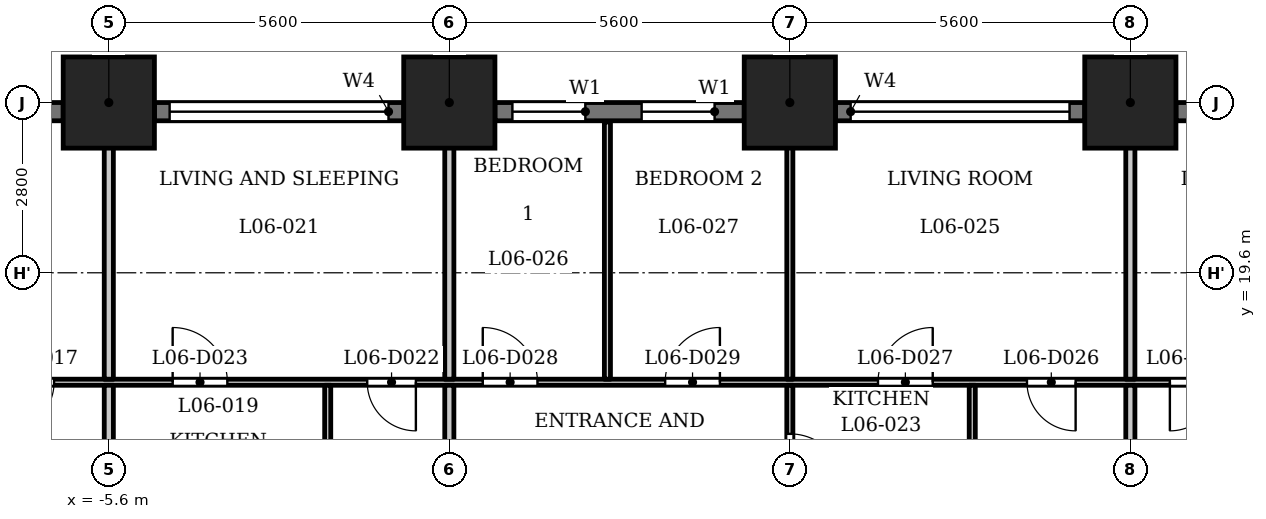
"""IFC4 building model, lengths in metres.
Left out: names, types, materials, properties, quantities, classifications, styles, units other than length and angle.
Written with IfcOpenShell. Run it as: python <this file> out.ifc"""

import sys

from ifc_helpers import new_model, si_unit, direction, frame, frame_2d, origin, origin_2d, place, context, subcontext, project, spatial, rectangle, extrude, element, fill, save


model = new_model("IFC4")
c1 = context("Model", 3, precision=1e-05, world=origin(), true_north=direction((0.0, 1.0)))
c2 = subcontext(c1, "Body", "Model", "MODEL_VIEW")
j1 = project(units=[si_unit("LENGTHUNIT", "METRE"), si_unit("PLANEANGLEUNIT", "RADIAN")], contexts=[c1])
p1 = place(None, origin())
s1 = spatial("IfcSite", under=j1, at=p1, CompositionType="ELEMENT")
p2 = place(p1, origin())
s2 = spatial("IfcBuilding", under=s1, at=p2, CompositionType="ELEMENT")
p3 = place(p2, frame((0.0, 0.0, 30.5)))
s3 = spatial("IfcBuildingStorey", under=s2, at=p3, CompositionType="ELEMENT", Elevation=30.5)
for number, where, z_axis, x_axis in (
    (1, (11.2, 22.4, 0.0), (0.0, 0.0, 1.0), (1.0, 0.0, 0.0)),
    (2, (5.6, 22.4, 0.0), (0.0, 0.0, 1.0), (1.0, 0.0, 0.0)),
    (3, (0.0, 22.4, 0.0), (0.0, 0.0, 1.0), (1.0, 0.0, 0.0)),
    (4, (-5.6, 22.4, 0.0), (0.0, 0.0, 1.0), (1.0, 0.0, 0.0)),
):
    element("IfcColumn", number, at=place(p3, frame(where, z_axis=z_axis, x_axis=x_axis)), inside=s3, PredefinedType="COLUMN", context=c2, shape_type="SweptSolid", body=[
        extrude(rectangle(XDim=1.5, YDim=1.5, at=origin_2d()), origin(), (0.0, 0.0, 1.0), 3.5),
    ])
p4 = place(p3, frame((16.05, 22.25, 0.0), z_axis=(0.0, 0.0, 1.0), x_axis=(-1.0, 0.0, 0.0)))
e5 = element("IfcWall", 5, at=p4, inside=s3, PredefinedType="SOLIDWALL", context=c2, shape_type="SweptSolid", body=[
    extrude(rectangle(XDim=4.1, YDim=0.3, at=frame_2d((2.05, 0.0))), origin(), (0.0, 0.0, 1.0), 2.35),
])
p5 = place(p4, frame((0.25, 0.0, 1.2)))
e6 = element("IfcOpeningElement", 6, at=p5, cuts=e5, PredefinedType="OPENING", context=c2, shape_type="SweptSolid", body=[
    extrude(rectangle(XDim=3.6, YDim=0.95, at=frame_2d((1.8, 0.475))), frame((0.0, 0.16, 0.0), z_axis=(0.0, -1.0, 0.0), x_axis=(1.0, 0.0, 0.0)), (0.0, 0.0, 1.0), 0.32),
])
p6 = place(p3, frame((10.45, 22.25, 0.0), z_axis=(0.0, 0.0, 1.0), x_axis=(-1.0, 0.0, 0.0)))
e7 = element("IfcWall", 7, at=p6, inside=s3, PredefinedType="SOLIDWALL", context=c2, shape_type="SweptSolid", body=[
    extrude(rectangle(XDim=4.1, YDim=0.3, at=frame_2d((2.05, 0.0))), origin(), (0.0, 0.0, 1.0), 2.35),
])
p7 = place(p6, frame((0.25, 0.0, 1.2)))
e8 = element("IfcOpeningElement", 8, at=p7, cuts=e7, PredefinedType="OPENING", context=c2, shape_type="SweptSolid", body=[
    extrude(rectangle(XDim=3.6, YDim=0.95, at=frame_2d((1.8, 0.475))), frame((0.0, 0.16, 0.0), z_axis=(0.0, -1.0, 0.0), x_axis=(1.0, 0.0, 0.0)), (0.0, 0.0, 1.0), 0.32),
])
p8 = place(p3, frame((4.85, 22.25, 0.0), z_axis=(0.0, 0.0, 1.0), x_axis=(-1.0, 0.0, 0.0)))
e9 = element("IfcWall", 9, at=p8, inside=s3, PredefinedType="SOLIDWALL", context=c2, shape_type="SweptSolid", body=[
    extrude(rectangle(XDim=4.1, YDim=0.3, at=frame_2d((2.05, 0.0))), origin(), (0.0, 0.0, 1.0), 2.35),
])
p9 = place(p8, frame((0.488, 0.0, 0.6)))
e10 = element("IfcOpeningElement", 10, at=p9, cuts=e9, PredefinedType="OPENING", context=c2, shape_type="SweptSolid", body=[
    extrude(rectangle(XDim=1.2, YDim=1.55, at=frame_2d((0.6, 0.775))), frame((0.0, 0.16, 0.0), z_axis=(0.0, -1.0, 0.0), x_axis=(1.0, 0.0, 0.0)), (0.0, 0.0, 1.0), 0.32),
])
p10 = place(p8, frame((2.613, 0.0, 0.6)))
e11 = element("IfcOpeningElement", 11, at=p10, cuts=e9, PredefinedType="OPENING", context=c2, shape_type="SweptSolid", body=[
    extrude(rectangle(XDim=1.2, YDim=1.55, at=frame_2d((0.6, 0.775))), frame((0.0, 0.16, 0.0), z_axis=(0.0, -1.0, 0.0), x_axis=(1.0, 0.0, 0.0)), (0.0, 0.0, 1.0), 0.32),
])
p11 = place(p3, frame((-0.75, 22.25, 0.0), z_axis=(0.0, 0.0, 1.0), x_axis=(-1.0, 0.0, 0.0)))
e12 = element("IfcWall", 12, at=p11, inside=s3, PredefinedType="SOLIDWALL", context=c2, shape_type="SweptSolid", body=[
    extrude(rectangle(XDim=4.1, YDim=0.3, at=frame_2d((2.05, 0.0))), origin(), (0.0, 0.0, 1.0), 2.35),
])
p12 = place(p11, frame((0.25, 0.0, 1.2)))
e13 = element("IfcOpeningElement", 13, at=p12, cuts=e12, PredefinedType="OPENING", context=c2, shape_type="SweptSolid", body=[
    extrude(rectangle(XDim=3.6, YDim=0.95, at=frame_2d((1.8, 0.475))), frame((0.0, 0.16, 0.0), z_axis=(0.0, -1.0, 0.0), x_axis=(1.0, 0.0, 0.0)), (0.0, 0.0, 1.0), 0.32),
])
p13 = place(p3, frame((-6.35, 22.25, 0.0), z_axis=(0.0, 0.0, 1.0), x_axis=(-1.0, 0.0, 0.0)))
e14 = element("IfcWall", 14, at=p13, inside=s3, PredefinedType="SOLIDWALL", context=c2, shape_type="SweptSolid", body=[
    extrude(rectangle(XDim=4.1, YDim=0.3, at=frame_2d((2.05, 0.0))), origin(), (0.0, 0.0, 1.0), 2.35),
])
p14 = place(p13, frame((0.75, 0.0, 0.9)))
e15 = element("IfcOpeningElement", 15, at=p14, cuts=e14, PredefinedType="OPENING", context=c2, shape_type="SweptSolid", body=[
    extrude(rectangle(XDim=2.6, YDim=1.25, at=frame_2d((1.3, 0.625))), frame((0.0, 0.16, 0.0), z_axis=(0.0, -1.0, 0.0), x_axis=(1.0, 0.0, 0.0)), (0.0, 0.0, 1.0), 0.32),
])
p15 = place(p3, frame((-26.732, 17.8, 0.0), z_axis=(0.0, 0.0, 1.0), x_axis=(1.0, 0.0, 0.0)))
e16 = element("IfcWall", 16, at=p15, inside=s3, PredefinedType="PARTITIONING", context=c2, shape_type="SweptSolid", body=[
    extrude(rectangle(XDim=53.126, YDim=0.1, at=frame_2d((26.563, 0.0))), origin(), (0.0, 0.0, 1.0), 3.2),
])
p16 = place(p15, frame((2.964, 0.0, 0.0)))
e17 = element("IfcOpeningElement", 17, at=p16, cuts=e16, PredefinedType="OPENING", context=c2, shape_type="SweptSolid", body=[
    extrude(rectangle(XDim=0.8, YDim=2.1, at=frame_2d((0.4, 1.05))), frame((0.0, 0.06, 0.0), z_axis=(0.0, -1.0, 0.0), x_axis=(1.0, 0.0, 0.0)), (0.0, 0.0, 1.0), 0.12),
])
p17 = place(p15, frame((7.132, 0.0, 0.0)))
e18 = element("IfcOpeningElement", 18, at=p17, cuts=e16, PredefinedType="OPENING", context=c2, shape_type="SweptSolid", body=[
    extrude(rectangle(XDim=0.9, YDim=2.1, at=frame_2d((0.45, 1.05))), frame((0.0, 0.06, 0.0), z_axis=(0.0, -1.0, 0.0), x_axis=(1.0, 0.0, 0.0)), (0.0, 0.0, 1.0), 0.12),
])
p18 = place(p15, frame((19.432, 0.0, 0.0)))
e19 = element("IfcOpeningElement", 19, at=p18, cuts=e16, PredefinedType="OPENING", context=c2, shape_type="SweptSolid", body=[
    extrude(rectangle(XDim=0.8, YDim=2.1, at=frame_2d((0.4, 1.05))), frame((0.0, 0.06, 0.0), z_axis=(0.0, -1.0, 0.0), x_axis=(1.0, 0.0, 0.0)), (0.0, 0.0, 1.0), 0.12),
])
p19 = place(p15, frame((16.732, 0.0, 0.0)))
e20 = element("IfcOpeningElement", 20, at=p19, cuts=e16, PredefinedType="OPENING", context=c2, shape_type="SweptSolid", body=[
    extrude(rectangle(XDim=0.9, YDim=2.1, at=frame_2d((0.45, 1.05))), frame((0.0, 0.06, 0.0), z_axis=(0.0, -1.0, 0.0), x_axis=(1.0, 0.0, 0.0)), (0.0, 0.0, 1.0), 0.12),
])
p20 = place(p15, frame((10.982, 0.0, 0.0)))
e21 = element("IfcOpeningElement", 21, at=p20, cuts=e16, PredefinedType="OPENING", context=c2, shape_type="SweptSolid", body=[
    extrude(rectangle(XDim=0.9, YDim=2.1, at=frame_2d((0.45, 1.05))), frame((0.0, 0.06, 0.0), z_axis=(0.0, -1.0, 0.0), x_axis=(1.0, 0.0, 0.0)), (0.0, 0.0, 1.0), 0.12),
])
p21 = place(p15, frame((12.982, 0.0, 0.0)))
e22 = element("IfcOpeningElement", 22, at=p21, cuts=e16, PredefinedType="OPENING", context=c2, shape_type="SweptSolid", body=[
    extrude(rectangle(XDim=0.9, YDim=2.1, at=frame_2d((0.45, 1.05))), frame((0.0, 0.06, 0.0), z_axis=(0.0, -1.0, 0.0), x_axis=(1.0, 0.0, 0.0)), (0.0, 0.0, 1.0), 0.12),
])
p22 = place(p15, frame((25.382, 0.0, 0.0)))
e23 = element("IfcOpeningElement", 23, at=p22, cuts=e16, PredefinedType="OPENING", context=c2, shape_type="SweptSolid", body=[
    extrude(rectangle(XDim=0.8, YDim=2.1, at=frame_2d((0.4, 1.05))), frame((0.0, 0.06, 0.0), z_axis=(0.0, -1.0, 0.0), x_axis=(1.0, 0.0, 0.0)), (0.0, 0.0, 1.0), 0.12),
])
p23 = place(p15, frame((22.182, 0.0, 0.0)))
e24 = element("IfcOpeningElement", 24, at=p23, cuts=e16, PredefinedType="OPENING", context=c2, shape_type="SweptSolid", body=[
    extrude(rectangle(XDim=0.9, YDim=2.1, at=frame_2d((0.45, 1.05))), frame((0.0, 0.06, 0.0), z_axis=(0.0, -1.0, 0.0), x_axis=(1.0, 0.0, 0.0)), (0.0, 0.0, 1.0), 0.12),
])
p24 = place(p15, frame((36.232, 0.0, 0.0)))
e25 = element("IfcOpeningElement", 25, at=p24, cuts=e16, PredefinedType="OPENING", context=c2, shape_type="SweptSolid", body=[
    extrude(rectangle(XDim=0.8, YDim=2.1, at=frame_2d((0.4, 1.05))), frame((0.0, 0.06, 0.0), z_axis=(0.0, -1.0, 0.0), x_axis=(1.0, 0.0, 0.0)), (0.0, 0.0, 1.0), 0.12),
])
p25 = place(p15, frame((33.782, 0.0, 0.0)))
e26 = element("IfcOpeningElement", 26, at=p25, cuts=e16, PredefinedType="OPENING", context=c2, shape_type="SweptSolid", body=[
    extrude(rectangle(XDim=0.9, YDim=2.1, at=frame_2d((0.45, 1.05))), frame((0.0, 0.06, 0.0), z_axis=(0.0, -1.0, 0.0), x_axis=(1.0, 0.0, 0.0)), (0.0, 0.0, 1.0), 0.12),
])
p26 = place(p15, frame((27.282, 0.0, 0.0)))
e27 = element("IfcOpeningElement", 27, at=p26, cuts=e16, PredefinedType="OPENING", context=c2, shape_type="SweptSolid", body=[
    extrude(rectangle(XDim=0.9, YDim=2.1, at=frame_2d((0.45, 1.05))), frame((0.0, 0.06, 0.0), z_axis=(0.0, -1.0, 0.0), x_axis=(1.0, 0.0, 0.0)), (0.0, 0.0, 1.0), 0.12),
])
p27 = place(p15, frame((30.282, 0.0, 0.0)))
e28 = element("IfcOpeningElement", 28, at=p27, cuts=e16, PredefinedType="OPENING", context=c2, shape_type="SweptSolid", body=[
    extrude(rectangle(XDim=0.9, YDim=2.1, at=frame_2d((0.45, 1.05))), frame((0.0, 0.06, 0.0), z_axis=(0.0, -1.0, 0.0), x_axis=(1.0, 0.0, 0.0)), (0.0, 0.0, 1.0), 0.12),
])
p28 = place(p15, frame((38.582, 0.0, 0.0)))
e29 = element("IfcOpeningElement", 29, at=p28, cuts=e16, PredefinedType="OPENING", context=c2, shape_type="SweptSolid", body=[
    extrude(rectangle(XDim=0.8, YDim=2.1, at=frame_2d((0.4, 1.05))), frame((0.0, 0.06, 0.0), z_axis=(0.0, -1.0, 0.0), x_axis=(1.0, 0.0, 0.0)), (0.0, 0.0, 1.0), 0.12),
])
p29 = place(p15, frame((41.232, 0.0, 0.0)))
e30 = element("IfcOpeningElement", 30, at=p29, cuts=e16, PredefinedType="OPENING", context=c2, shape_type="SweptSolid", body=[
    extrude(rectangle(XDim=0.9, YDim=2.1, at=frame_2d((0.45, 1.05))), frame((0.0, 0.06, 0.0), z_axis=(0.0, -1.0, 0.0), x_axis=(1.0, 0.0, 0.0)), (0.0, 0.0, 1.0), 0.12),
])
p30 = place(p15, frame((51.532, 0.0, 0.0)))
e31 = element("IfcOpeningElement", 31, at=p30, cuts=e16, PredefinedType="OPENING", context=c2, shape_type="SweptSolid", body=[
    extrude(rectangle(XDim=0.8, YDim=2.1, at=frame_2d((0.4, 1.05))), frame((0.0, 0.06, 0.0), z_axis=(0.0, -1.0, 0.0), x_axis=(1.0, 0.0, 0.0)), (0.0, 0.0, 1.0), 0.12),
])
p31 = place(p15, frame((46.582, 0.0, 0.0)))
e32 = element("IfcOpeningElement", 32, at=p31, cuts=e16, PredefinedType="OPENING", context=c2, shape_type="SweptSolid", body=[
    extrude(rectangle(XDim=0.9, YDim=2.1, at=frame_2d((0.45, 1.05))), frame((0.0, 0.06, 0.0), z_axis=(0.0, -1.0, 0.0), x_axis=(1.0, 0.0, 0.0)), (0.0, 0.0, 1.0), 0.12),
])
p32 = place(p3, frame((-5.6, 15.475, 0.0), z_axis=(0.0, 0.0, 1.0), x_axis=(0.0, 1.0, 0.0)))
e33 = element("IfcWall", 33, at=p32, inside=s3, PredefinedType="PARTITIONING", context=c2, shape_type="SweptSolid", body=[
    extrude(rectangle(XDim=2.275, YDim=0.15, at=frame_2d((1.137, 0.0))), origin(), (0.0, 0.0, 1.0), 3.2),
])
p33 = place(p3, frame((-5.6, 17.85, 0.0), z_axis=(0.0, 0.0, 1.0), x_axis=(0.0, 1.0, 0.0)))
e34 = element("IfcWall", 34, at=p33, inside=s3, PredefinedType="PARTITIONING", context=c2, shape_type="SweptSolid", body=[
    extrude(rectangle(XDim=5.28, YDim=0.15, at=frame_2d((2.64, 0.0))), origin(), (0.0, 0.0, 1.0), 3.2),
])
p34 = place(p3, frame((-2.0, 15.475, 0.0), z_axis=(0.0, 0.0, 1.0), x_axis=(0.0, 1.0, 0.0)))
e35 = element("IfcWall", 35, at=p34, inside=s3, PredefinedType="PARTITIONING", context=c2, shape_type="SweptSolid", body=[
    extrude(rectangle(XDim=2.275, YDim=0.1, at=frame_2d((1.137, 0.0))), origin(), (0.0, 0.0, 1.0), 3.2),
])
p35 = place(p3, frame((0.0, 15.475, 0.0), z_axis=(0.0, 0.0, 1.0), x_axis=(0.0, 1.0, 0.0)))
e36 = element("IfcWall", 36, at=p35, inside=s3, PredefinedType="PARTITIONING", context=c2, shape_type="SweptSolid", body=[
    extrude(rectangle(XDim=2.275, YDim=0.15, at=frame_2d((1.137, 0.0))), origin(), (0.0, 0.0, 1.0), 3.2),
])
p36 = place(p3, frame((0.0, 17.85, 0.0), z_axis=(0.0, 0.0, 1.0), x_axis=(0.0, 1.0, 0.0)))
e37 = element("IfcWall", 37, at=p36, inside=s3, PredefinedType="PARTITIONING", context=c2, shape_type="SweptSolid", body=[
    extrude(rectangle(XDim=5.28, YDim=0.15, at=frame_2d((2.64, 0.0))), origin(), (0.0, 0.0, 1.0), 3.2),
])
p37 = place(p3, frame((2.6, 17.85, 0.0), z_axis=(0.0, 0.0, 1.0), x_axis=(0.0, 1.0, 0.0)))
e38 = element("IfcWall", 38, at=p37, inside=s3, PredefinedType="PARTITIONING", context=c2, shape_type="SweptSolid", body=[
    extrude(rectangle(XDim=4.23, YDim=0.1, at=frame_2d((2.115, 0.0))), origin(), (0.0, 0.0, 1.0), 3.2),
])
p38 = place(p3, frame((5.6, 15.475, 0.0), z_axis=(0.0, 0.0, 1.0), x_axis=(0.0, 1.0, 0.0)))
e39 = element("IfcWall", 39, at=p38, inside=s3, PredefinedType="PARTITIONING", context=c2, shape_type="SweptSolid", body=[
    extrude(rectangle(XDim=2.275, YDim=0.1, at=frame_2d((1.137, 0.0))), origin(), (0.0, 0.0, 1.0), 3.2),
])
p39 = place(p38, frame((0.576, 0.0, 0.0)))
e40 = element("IfcOpeningElement", 40, at=p39, cuts=e39, PredefinedType="OPENING", context=c2, shape_type="SweptSolid", body=[
    extrude(rectangle(XDim=0.9, YDim=2.1, at=frame_2d((0.45, 1.05))), frame((0.0, 0.06, 0.0), z_axis=(0.0, -1.0, 0.0), x_axis=(1.0, 0.0, 0.0)), (0.0, 0.0, 1.0), 0.12),
])
p40 = place(p3, frame((5.6, 17.85, 0.0), z_axis=(0.0, 0.0, 1.0), x_axis=(0.0, 1.0, 0.0)))
e41 = element("IfcWall", 41, at=p40, inside=s3, PredefinedType="PARTITIONING", context=c2, shape_type="SweptSolid", body=[
    extrude(rectangle(XDim=5.28, YDim=0.1, at=frame_2d((2.64, 0.0))), origin(), (0.0, 0.0, 1.0), 3.2),
])
p41 = place(p3, frame((8.6, 15.475, 0.0), z_axis=(0.0, 0.0, 1.0), x_axis=(0.0, 1.0, 0.0)))
e42 = element("IfcWall", 42, at=p41, inside=s3, PredefinedType="PARTITIONING", context=c2, shape_type="SweptSolid", body=[
    extrude(rectangle(XDim=2.275, YDim=0.1, at=frame_2d((1.137, 0.0))), origin(), (0.0, 0.0, 1.0), 3.2),
])
p42 = place(p3, frame((11.2, 15.475, 0.0), z_axis=(0.0, 0.0, 1.0), x_axis=(0.0, 1.0, 0.0)))
e43 = element("IfcWall", 43, at=p42, inside=s3, PredefinedType="PARTITIONING", context=c2, shape_type="SweptSolid", body=[
    extrude(rectangle(XDim=2.275, YDim=0.15, at=frame_2d((1.137, 0.0))), origin(), (0.0, 0.0, 1.0), 3.2),
])
p43 = place(p3, frame((11.2, 17.85, 0.0), z_axis=(0.0, 0.0, 1.0), x_axis=(0.0, 1.0, 0.0)))
e44 = element("IfcWall", 44, at=p43, inside=s3, PredefinedType="PARTITIONING", context=c2, shape_type="SweptSolid", body=[
    extrude(rectangle(XDim=5.28, YDim=0.15, at=frame_2d((2.64, 0.0))), origin(), (0.0, 0.0, 1.0), 3.2),
])
p44 = place(p18, origin())
e45 = element("IfcDoor", 45, at=p44, inside=s3, OperationType="SINGLE_SWING_LEFT", PredefinedType="DOOR", context=c2, shape_type="SweptSolid", body=[
    extrude(rectangle(XDim=0.8, YDim=2.1, at=frame_2d((0.4, 1.05))), frame((0.0, 0.025, 0.0), z_axis=(0.0, -1.0, 0.0), x_axis=(1.0, 0.0, 0.0)), (0.0, 0.0, 1.0), 0.05),
])
fill(e19, e45)
p45 = place(p22, origin())
e46 = element("IfcDoor", 46, at=p45, inside=s3, OperationType="SINGLE_SWING_RIGHT", PredefinedType="DOOR", context=c2, shape_type="SweptSolid", body=[
    extrude(rectangle(XDim=0.8, YDim=2.1, at=frame_2d((0.4, 1.05))), frame((0.0, 0.025, 0.0), z_axis=(0.0, -1.0, 0.0), x_axis=(1.0, 0.0, 0.0)), (0.0, 0.0, 1.0), 0.05),
])
fill(e23, e46)
p46 = place(p23, origin())
e47 = element("IfcDoor", 47, at=p46, inside=s3, OperationType="SINGLE_SWING_RIGHT", PredefinedType="DOOR", context=c2, shape_type="SweptSolid", body=[
    extrude(rectangle(XDim=0.9, YDim=2.1, at=frame_2d((0.45, 1.05))), frame((0.0, 0.025, 0.0), z_axis=(0.0, -1.0, 0.0), x_axis=(1.0, 0.0, 0.0)), (0.0, 0.0, 1.0), 0.05),
])
fill(e24, e47)
p47 = place(p39, origin())
e48 = element("IfcDoor", 48, at=p47, inside=s3, OperationType="SINGLE_SWING_LEFT", PredefinedType="DOOR", context=c2, shape_type="SweptSolid", body=[
    extrude(rectangle(XDim=0.9, YDim=2.1, at=frame_2d((0.45, 1.05))), frame((0.0, 0.025, 0.0), z_axis=(0.0, -1.0, 0.0), x_axis=(1.0, 0.0, 0.0)), (0.0, 0.0, 1.0), 0.05),
])
fill(e40, e48)
p48 = place(p24, origin())
e49 = element("IfcDoor", 49, at=p48, inside=s3, OperationType="SINGLE_SWING_RIGHT", PredefinedType="DOOR", context=c2, shape_type="SweptSolid", body=[
    extrude(rectangle(XDim=0.8, YDim=2.1, at=frame_2d((0.4, 1.05))), frame((0.0, 0.025, 0.0), z_axis=(0.0, -1.0, 0.0), x_axis=(1.0, 0.0, 0.0)), (0.0, 0.0, 1.0), 0.05),
])
fill(e25, e49)
p49 = place(p25, origin())
e50 = element("IfcDoor", 50, at=p49, inside=s3, OperationType="SINGLE_SWING_LEFT", PredefinedType="DOOR", context=c2, shape_type="SweptSolid", body=[
    extrude(rectangle(XDim=0.9, YDim=2.1, at=frame_2d((0.45, 1.05))), frame((0.0, 0.025, 0.0), z_axis=(0.0, -1.0, 0.0), x_axis=(1.0, 0.0, 0.0)), (0.0, 0.0, 1.0), 0.05),
])
fill(e26, e50)
p50 = place(p26, origin())
e51 = element("IfcDoor", 51, at=p50, inside=s3, OperationType="SINGLE_SWING_RIGHT", PredefinedType="DOOR", context=c2, shape_type="SweptSolid", body=[
    extrude(rectangle(XDim=0.9, YDim=2.1, at=frame_2d((0.45, 1.05))), frame((0.0, 0.025, 0.0), z_axis=(0.0, -1.0, 0.0), x_axis=(1.0, 0.0, 0.0)), (0.0, 0.0, 1.0), 0.05),
])
fill(e27, e51)
p51 = place(p27, origin())
e52 = element("IfcDoor", 52, at=p51, inside=s3, OperationType="SINGLE_SWING_LEFT", PredefinedType="DOOR", context=c2, shape_type="SweptSolid", body=[
    extrude(rectangle(XDim=0.9, YDim=2.1, at=frame_2d((0.45, 1.05))), frame((0.0, 0.025, 0.0), z_axis=(0.0, -1.0, 0.0), x_axis=(1.0, 0.0, 0.0)), (0.0, 0.0, 1.0), 0.05),
])
fill(e28, e52)
p52 = place(p28, origin())
e53 = element("IfcDoor", 53, at=p52, inside=s3, OperationType="SINGLE_SWING_LEFT", PredefinedType="DOOR", context=c2, shape_type="SweptSolid", body=[
    extrude(rectangle(XDim=0.8, YDim=2.1, at=frame_2d((0.4, 1.05))), frame((0.0, 0.025, 0.0), z_axis=(0.0, -1.0, 0.0), x_axis=(1.0, 0.0, 0.0)), (0.0, 0.0, 1.0), 0.05),
])
fill(e29, e53)
p53 = place(p7, origin())
e54 = element("IfcWindow", 54, at=p53, inside=s3, PartitioningType="SINGLE_PANEL", PredefinedType="WINDOW", context=c2, shape_type="SweptSolid", body=[
    extrude(rectangle(XDim=3.6, YDim=0.95, at=frame_2d((1.8, 0.475))), frame((0.0, 0.03, 0.0), z_axis=(0.0, -1.0, 0.0), x_axis=(1.0, 0.0, 0.0)), (0.0, 0.0, 1.0), 0.06),
])
fill(e8, e54)
p54 = place(p9, origin())
e55 = element("IfcWindow", 55, at=p54, inside=s3, PartitioningType="SINGLE_PANEL", PredefinedType="WINDOW", context=c2, shape_type="SweptSolid", body=[
    extrude(rectangle(XDim=1.2, YDim=1.55, at=frame_2d((0.6, 0.775))), frame((0.0, 0.03, 0.0), z_axis=(0.0, -1.0, 0.0), x_axis=(1.0, 0.0, 0.0)), (0.0, 0.0, 1.0), 0.06),
])
fill(e10, e55)
p55 = place(p10, origin())
e56 = element("IfcWindow", 56, at=p55, inside=s3, PartitioningType="SINGLE_PANEL", PredefinedType="WINDOW", context=c2, shape_type="SweptSolid", body=[
    extrude(rectangle(XDim=1.2, YDim=1.55, at=frame_2d((0.6, 0.775))), frame((0.0, 0.03, 0.0), z_axis=(0.0, -1.0, 0.0), x_axis=(1.0, 0.0, 0.0)), (0.0, 0.0, 1.0), 0.06),
])
fill(e11, e56)
p56 = place(p12, origin())
e57 = element("IfcWindow", 57, at=p56, inside=s3, PartitioningType="SINGLE_PANEL", PredefinedType="WINDOW", context=c2, shape_type="SweptSolid", body=[
    extrude(rectangle(XDim=3.6, YDim=0.95, at=frame_2d((1.8, 0.475))), frame((0.0, 0.03, 0.0), z_axis=(0.0, -1.0, 0.0), x_axis=(1.0, 0.0, 0.0)), (0.0, 0.0, 1.0), 0.06),
])
fill(e13, e57)
save(model, sys.argv[1])
